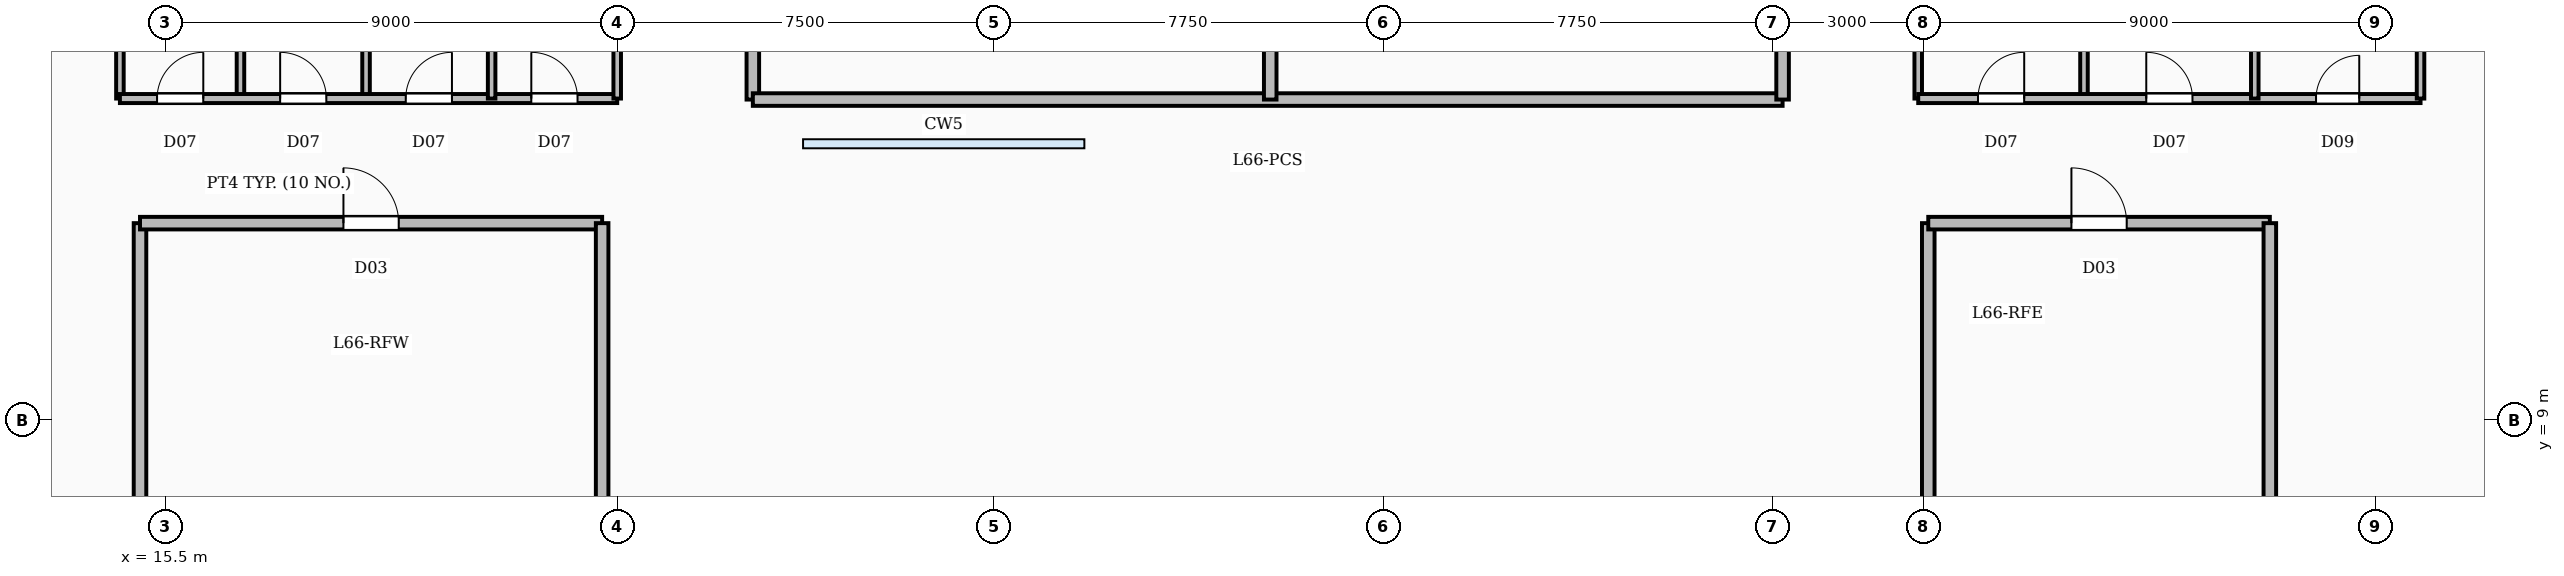
"""IFC4 building model, lengths in metres.
Left out: names, types, materials, properties, quantities, classifications, styles, units other than length and angle.
Written with IfcOpenShell. Run it as: python <this file> out.ifc"""

import sys

from ifc_helpers import new_model, si_unit, direction, frame, frame_2d, origin, origin_2d, place, context, subcontext, project, spatial, rectangle, circle, extrude, element, fill, save


model = new_model("IFC4")
c1 = context("Model", 3, precision=1e-05, world=origin(), true_north=direction((0.0, 1.0)))
c2 = subcontext(c1, "Body", "Model", "MODEL_VIEW")
j1 = project(units=[si_unit("LENGTHUNIT", "METRE"), si_unit("PLANEANGLEUNIT", "RADIAN")], contexts=[c1])
p1 = place(None, origin())
s1 = spatial("IfcSite", under=j1, at=p1, CompositionType="ELEMENT")
p2 = place(p1, origin())
s2 = spatial("IfcBuilding", under=s1, at=p2, CompositionType="ELEMENT")
p3 = place(p2, frame((0.0, 0.0, 269.7)))
s3 = spatial("IfcBuildingStorey", under=s2, at=p3, CompositionType="ELEMENT", Elevation=269.7)
p4 = place(p3, frame((15.208, 5.351, -0.188), z_axis=(-0.120840168881, 0.364867382693, 0.92318440554), x_axis=(-0.949292127021, -0.314395384152, 0.0)))
e1 = element("IfcColumn", 1, at=p4, inside=s3, PredefinedType="COLUMN", context=c2, shape_type="SweptSolid", body=[
    extrude(circle(Radius=0.48, at=origin_2d()), origin(), (0.0, 0.0, 1.0), 5.097),
])
p5 = place(p3, frame((26.659, 4.046, -0.091), z_axis=(-0.205244638376, 0.573148121095, 0.793332130764), x_axis=(-0.941455999234, -0.337135879885, 0.0)))
e2 = element("IfcColumn", 2, at=p5, inside=s3, PredefinedType="COLUMN", context=c2, shape_type="SweptSolid", body=[
    extrude(circle(Radius=0.48, at=origin_2d()), origin(), (0.0, 0.0, 1.0), 5.687),
])
p6 = place(p3, frame((38.11, 2.741, -0.025), z_axis=(-0.259501200742, 0.703591478358, 0.661527141088), x_axis=(-0.938220517325, -0.346037947155, 0.0)))
e3 = element("IfcColumn", 3, at=p6, inside=s3, PredefinedType="COLUMN", context=c2, shape_type="SweptSolid", body=[
    extrude(circle(Radius=0.48, at=origin_2d()), origin(), (0.0, 0.0, 1.0), 6.622),
])
p7 = place(p3, frame((49.56, 1.437, 0.017), z_axis=(-0.292214716361, 0.780171799201, 0.553120713112), x_axis=(-0.936467110828, -0.350755399583, 0.0)))
e4 = element("IfcColumn", 4, at=p7, inside=s3, PredefinedType="COLUMN", context=c2, shape_type="SweptSolid", body=[
    extrude(circle(Radius=0.48, at=origin_2d()), origin(), (0.0, 0.0, 1.0), 7.767),
])
p8 = place(p3, frame((61.011, 0.132, 0.045), z_axis=(-0.312368448743, 0.825846386811, 0.469471721855), x_axis=(-0.935328973768, -0.353779183715, 0.0)))
e5 = element("IfcColumn", 5, at=p8, inside=s3, PredefinedType="COLUMN", context=c2, shape_type="SweptSolid", body=[
    extrude(circle(Radius=0.48, at=origin_2d()), origin(), (0.0, 0.0, 1.0), 9.032),
])
p9 = place(p3, frame((64.854, 1.094, 0.052), z_axis=(-0.31380077532, 0.837654155529, 0.447062175914), x_axis=(-0.936446566902, -0.35081024406, 0.0)))
e6 = element("IfcColumn", 6, at=p9, inside=s3, PredefinedType="COLUMN", context=c2, shape_type="SweptSolid", body=[
    extrude(circle(Radius=0.48, at=origin_2d()), origin(), (0.0, 0.0, 1.0), 9.455),
])
p10 = place(p3, frame((10.241, 10.697, 0.0), z_axis=(0.0, 0.0, 1.0), x_axis=(0.113196122102, 0.993572663644, 0.0)))
e7 = element("IfcWall", 7, at=p10, inside=s3, PredefinedType="SOLIDWALL", context=c2, shape_type="SweptSolid", body=[
    extrude(rectangle(XDim=34.5, YDim=0.42, at=frame_2d((17.25, 0.0))), origin(), (0.0, 0.0, 1.0), 4.75),
])
for number, where, z_axis, x_axis in (
    (8, (17.0, 15.4, 0.0), (0.0, 0.0, 1.0), (0.0, 1.0, 0.0)),
    (9, (19.5, 15.4, 0.0), (0.0, 0.0, 1.0), (0.0, 1.0, 0.0)),
    (10, (22.0, 15.4, 0.0), (0.0, 0.0, 1.0), (0.0, 1.0, 0.0)),
):
    element("IfcWall", number, at=place(p3, frame(where, z_axis=z_axis, x_axis=x_axis)), inside=s3, PredefinedType="PARTITIONING", context=c2, shape_type="SweptSolid", body=[
        extrude(rectangle(XDim=3.58, YDim=0.15, at=frame_2d((1.79, 0.0))), origin(), (0.0, 0.0, 1.0), 3.81),
    ])
p11 = place(p3, frame((14.6, 15.4, 0.0), z_axis=(0.0, 0.0, 1.0), x_axis=(1.0, 0.0, 0.0)))
e11 = element("IfcWall", 11, at=p11, inside=s3, PredefinedType="PARTITIONING", context=c2, shape_type="SweptSolid", body=[
    extrude(rectangle(XDim=9.9, YDim=0.18, at=frame_2d((4.95, 0.0))), origin(), (0.0, 0.0, 1.0), 3.81),
])
p12 = place(p11, frame((0.74, 0.0, 0.0)))
e12 = element("IfcOpeningElement", 12, at=p12, cuts=e11, PredefinedType="OPENING", context=c2, shape_type="SweptSolid", body=[
    extrude(rectangle(XDim=0.92, YDim=2.1, at=frame_2d((0.46, 1.05))), frame((0.0, 0.1, 0.0), z_axis=(0.0, -1.0, 0.0), x_axis=(1.0, 0.0, 0.0)), (0.0, 0.0, 1.0), 0.2),
])
p13 = place(p11, frame((3.19, 0.0, 0.0)))
e13 = element("IfcOpeningElement", 13, at=p13, cuts=e11, PredefinedType="OPENING", context=c2, shape_type="SweptSolid", body=[
    extrude(rectangle(XDim=0.92, YDim=2.1, at=frame_2d((0.46, 1.05))), frame((0.0, 0.1, 0.0), z_axis=(0.0, -1.0, 0.0), x_axis=(1.0, 0.0, 0.0)), (0.0, 0.0, 1.0), 0.2),
])
p14 = place(p11, frame((5.69, 0.0, 0.0)))
e14 = element("IfcOpeningElement", 14, at=p14, cuts=e11, PredefinedType="OPENING", context=c2, shape_type="SweptSolid", body=[
    extrude(rectangle(XDim=0.92, YDim=2.1, at=frame_2d((0.46, 1.05))), frame((0.0, 0.1, 0.0), z_axis=(0.0, -1.0, 0.0), x_axis=(1.0, 0.0, 0.0)), (0.0, 0.0, 1.0), 0.2),
])
p15 = place(p11, frame((8.19, 0.0, 0.0)))
e15 = element("IfcOpeningElement", 15, at=p15, cuts=e11, PredefinedType="OPENING", context=c2, shape_type="SweptSolid", body=[
    extrude(rectangle(XDim=0.92, YDim=2.1, at=frame_2d((0.46, 1.05))), frame((0.0, 0.1, 0.0), z_axis=(0.0, -1.0, 0.0), x_axis=(1.0, 0.0, 0.0)), (0.0, 0.0, 1.0), 0.2),
])
for number, where, z_axis, x_axis in (
    (16, (14.6, 15.4, 0.0), (0.0, 0.0, 1.0), (0.0, 1.0, 0.0)),
    (17, (24.5, 15.4, 0.0), (0.0, 0.0, 1.0), (0.0, 1.0, 0.0)),
):
    element("IfcWall", number, at=place(p3, frame(where, z_axis=z_axis, x_axis=x_axis)), inside=s3, PredefinedType="PARTITIONING", context=c2, shape_type="SweptSolid", body=[
        extrude(rectangle(XDim=3.58, YDim=0.15, at=frame_2d((1.79, 0.0))), origin(), (0.0, 0.0, 1.0), 2.8),
    ])
for number, where, z_axis, x_axis in (
    (18, (53.7, 15.4, 0.0), (0.0, 0.0, 1.0), (0.0, 1.0, 0.0)),
    (19, (57.1, 15.4, 0.0), (0.0, 0.0, 1.0), (0.0, 1.0, 0.0)),
):
    element("IfcWall", number, at=place(p3, frame(where, z_axis=z_axis, x_axis=x_axis)), inside=s3, PredefinedType="PARTITIONING", context=c2, shape_type="SweptSolid", body=[
        extrude(rectangle(XDim=3.58, YDim=0.15, at=frame_2d((1.79, 0.0))), origin(), (0.0, 0.0, 1.0), 3.81),
    ])
p16 = place(p3, frame((50.4, 15.4, 0.0), z_axis=(0.0, 0.0, 1.0), x_axis=(1.0, 0.0, 0.0)))
e20 = element("IfcWall", 20, at=p16, inside=s3, PredefinedType="SOLIDWALL", context=c2, shape_type="SweptSolid", body=[
    extrude(rectangle(XDim=10.0, YDim=0.18, at=frame_2d((5.0, 0.0))), origin(), (0.0, 0.0, 1.0), 3.81),
])
p17 = place(p16, frame((1.19, 0.0, 0.0)))
e21 = element("IfcOpeningElement", 21, at=p17, cuts=e20, PredefinedType="OPENING", context=c2, shape_type="SweptSolid", body=[
    extrude(rectangle(XDim=0.92, YDim=2.1, at=frame_2d((0.46, 1.05))), frame((0.0, 0.1, 0.0), z_axis=(0.0, -1.0, 0.0), x_axis=(1.0, 0.0, 0.0)), (0.0, 0.0, 1.0), 0.2),
])
p18 = place(p16, frame((4.54, 0.0, 0.0)))
e22 = element("IfcOpeningElement", 22, at=p18, cuts=e20, PredefinedType="OPENING", context=c2, shape_type="SweptSolid", body=[
    extrude(rectangle(XDim=0.92, YDim=2.1, at=frame_2d((0.46, 1.05))), frame((0.0, 0.1, 0.0), z_axis=(0.0, -1.0, 0.0), x_axis=(1.0, 0.0, 0.0)), (0.0, 0.0, 1.0), 0.2),
])
p19 = place(p16, frame((7.92, 0.0, 0.0)))
e23 = element("IfcOpeningElement", 23, at=p19, cuts=e20, PredefinedType="OPENING", context=c2, shape_type="SweptSolid", body=[
    extrude(rectangle(XDim=0.86, YDim=2.05, at=frame_2d((0.43, 1.025))), frame((0.0, 0.1, 0.0), z_axis=(0.0, -1.0, 0.0), x_axis=(1.0, 0.0, 0.0)), (0.0, 0.0, 1.0), 0.2),
])
for number, where, z_axis, x_axis in (
    (24, (50.4, 15.4, 0.0), (0.0, 0.0, 1.0), (0.0, 1.0, 0.0)),
    (25, (60.4, 15.4, 0.0), (0.0, 0.0, 1.0), (0.0, 1.0, 0.0)),
):
    element("IfcWall", number, at=place(p3, frame(where, z_axis=z_axis, x_axis=x_axis)), inside=s3, PredefinedType="PARTITIONING", context=c2, shape_type="SweptSolid", body=[
        extrude(rectangle(XDim=3.58, YDim=0.15, at=frame_2d((1.79, 0.0))), origin(), (0.0, 0.0, 1.0), 2.8),
    ])
p20 = place(p3, frame((37.5, 15.38, 0.0), z_axis=(0.0, 0.0, 1.0), x_axis=(0.0, 1.0, 0.0)))
e26 = element("IfcWall", 26, at=p20, inside=s3, PredefinedType="SOLIDWALL", context=c2, shape_type="SweptSolid", body=[
    extrude(rectangle(XDim=20.84, YDim=0.25, at=frame_2d((10.42, 0.0))), origin(), (0.0, 0.0, 1.0), 3.81),
])
p21 = place(p3, frame((27.2, 15.38, 0.0), z_axis=(0.0, 0.0, 1.0), x_axis=(1.0, 0.0, 0.0)))
e27 = element("IfcWall", 27, at=p21, inside=s3, PredefinedType="SOLIDWALL", context=c2, shape_type="SweptSolid", body=[
    extrude(rectangle(XDim=20.5, YDim=0.25, at=frame_2d((10.25, 0.0))), origin(), (0.0, 0.0, 1.0), 3.81),
])
p22 = place(p3, frame((27.2, 15.38, 0.0), z_axis=(0.0, 0.0, 1.0), x_axis=(0.0, 1.0, 0.0)))
e28 = element("IfcWall", 28, at=p22, inside=s3, PredefinedType="SOLIDWALL", context=c2, shape_type="SweptSolid", body=[
    extrude(rectangle(XDim=20.84, YDim=0.25, at=frame_2d((10.42, 0.0))), origin(), (0.0, 0.0, 1.0), 3.81),
])
p23 = place(p22, frame((4.8, 0.0, 0.0)))
e29 = element("IfcOpeningElement", 29, at=p23, cuts=e28, PredefinedType="OPENING", context=c2, shape_type="SweptSolid", body=[
    extrude(rectangle(XDim=1.2, YDim=2.2, at=frame_2d((0.6, 1.1))), frame((0.0, 0.135, 0.0), z_axis=(0.0, -1.0, 0.0), x_axis=(1.0, 0.0, 0.0)), (0.0, 0.0, 1.0), 0.27),
])
p24 = place(p22, frame((14.5, 0.0, 0.0)))
e30 = element("IfcOpeningElement", 30, at=p24, cuts=e28, PredefinedType="OPENING", context=c2, shape_type="SweptSolid", body=[
    extrude(rectangle(XDim=1.2, YDim=2.2, at=frame_2d((0.6, 1.1))), frame((0.0, 0.135, 0.0), z_axis=(0.0, -1.0, 0.0), x_axis=(1.0, 0.0, 0.0)), (0.0, 0.0, 1.0), 0.27),
])
p25 = place(p3, frame((47.7, 15.38, 0.0), z_axis=(0.0, 0.0, 1.0), x_axis=(0.0, 1.0, 0.0)))
e31 = element("IfcWall", 31, at=p25, inside=s3, PredefinedType="SOLIDWALL", context=c2, shape_type="SweptSolid", body=[
    extrude(rectangle(XDim=20.84, YDim=0.25, at=frame_2d((10.42, 0.0))), origin(), (0.0, 0.0, 1.0), 3.81),
])
p26 = place(p25, frame((4.8, 0.0, 0.0)))
e32 = element("IfcOpeningElement", 32, at=p26, cuts=e31, PredefinedType="OPENING", context=c2, shape_type="SweptSolid", body=[
    extrude(rectangle(XDim=1.2, YDim=2.2, at=frame_2d((0.6, 1.1))), frame((0.0, 0.135, 0.0), z_axis=(0.0, -1.0, 0.0), x_axis=(1.0, 0.0, 0.0)), (0.0, 0.0, 1.0), 0.27),
])
p27 = place(p25, frame((14.5, 0.0, 0.0)))
e33 = element("IfcOpeningElement", 33, at=p27, cuts=e31, PredefinedType="OPENING", context=c2, shape_type="SweptSolid", body=[
    extrude(rectangle(XDim=1.2, YDim=2.2, at=frame_2d((0.6, 1.1))), frame((0.0, 0.135, 0.0), z_axis=(0.0, -1.0, 0.0), x_axis=(1.0, 0.0, 0.0)), (0.0, 0.0, 1.0), 0.27),
])
p28 = place(p3, frame((15.0, 12.92, 0.0), z_axis=(0.0, 0.0, 1.0), x_axis=(1.0, 0.0, 0.0)))
e34 = element("IfcWall", 34, at=p28, inside=s3, PredefinedType="SOLIDWALL", context=c2, shape_type="SweptSolid", body=[
    extrude(rectangle(XDim=9.2, YDim=0.25, at=frame_2d((4.6, 0.0))), origin(), (0.0, 0.0, 1.0), 3.81),
])
p29 = place(p28, frame((4.05, 0.0, 0.0)))
e35 = element("IfcOpeningElement", 35, at=p29, cuts=e34, PredefinedType="OPENING", context=c2, shape_type="SweptSolid", body=[
    extrude(rectangle(XDim=1.1, YDim=2.15, at=frame_2d((0.55, 1.075))), frame((0.0, 0.135, 0.0), z_axis=(0.0, -1.0, 0.0), x_axis=(1.0, 0.0, 0.0)), (0.0, 0.0, 1.0), 0.27),
])
p30 = place(p3, frame((15.0, 5.284, 0.0), z_axis=(0.0, 0.0, 1.0), x_axis=(0.0, 1.0, 0.0)))
e36 = element("IfcWall", 36, at=p30, inside=s3, PredefinedType="SOLIDWALL", context=c2, shape_type="SweptSolid", body=[
    extrude(rectangle(XDim=7.636, YDim=0.25, at=frame_2d((3.818, 0.0))), origin(), (0.0, 0.0, 1.0), 2.8),
])
p31 = place(p3, frame((24.2, 4.236, 0.0), z_axis=(0.0, 0.0, 1.0), x_axis=(0.0, 1.0, 0.0)))
e37 = element("IfcWall", 37, at=p31, inside=s3, PredefinedType="SOLIDWALL", context=c2, shape_type="SweptSolid", body=[
    extrude(rectangle(XDim=8.684, YDim=0.25, at=frame_2d((4.342, 0.0))), origin(), (0.0, 0.0, 1.0), 3.81),
])
p32 = place(p3, frame((50.6, 12.92, 0.0), z_axis=(0.0, 0.0, 1.0), x_axis=(1.0, 0.0, 0.0)))
e38 = element("IfcWall", 38, at=p32, inside=s3, PredefinedType="SOLIDWALL", context=c2, shape_type="SweptSolid", body=[
    extrude(rectangle(XDim=6.8, YDim=0.25, at=frame_2d((3.4, 0.0))), origin(), (0.0, 0.0, 1.0), 3.81),
])
p33 = place(p32, frame((2.85, 0.0, 0.0)))
e39 = element("IfcOpeningElement", 39, at=p33, cuts=e38, PredefinedType="OPENING", context=c2, shape_type="SweptSolid", body=[
    extrude(rectangle(XDim=1.1, YDim=2.15, at=frame_2d((0.55, 1.075))), frame((0.0, 0.135, 0.0), z_axis=(0.0, -1.0, 0.0), x_axis=(1.0, 0.0, 0.0)), (0.0, 0.0, 1.0), 0.27),
])
p34 = place(p3, frame((50.6, 1.228, 0.0), z_axis=(0.0, 0.0, 1.0), x_axis=(0.0, 1.0, 0.0)))
e40 = element("IfcWall", 40, at=p34, inside=s3, PredefinedType="SOLIDWALL", context=c2, shape_type="SweptSolid", body=[
    extrude(rectangle(XDim=11.692, YDim=0.25, at=frame_2d((5.846, 0.0))), origin(), (0.0, 0.0, 1.0), 3.81),
])
p35 = place(p3, frame((57.4, 0.453, 0.0), z_axis=(0.0, 0.0, 1.0), x_axis=(0.0, 1.0, 0.0)))
e41 = element("IfcWall", 41, at=p35, inside=s3, PredefinedType="SOLIDWALL", context=c2, shape_type="SweptSolid", body=[
    extrude(rectangle(XDim=12.467, YDim=0.25, at=frame_2d((6.233, 0.0))), origin(), (0.0, 0.0, 1.0), 3.81),
])
p36 = place(p12, origin())
e42 = element("IfcDoor", 42, at=p36, inside=s3, OperationType="SINGLE_SWING_RIGHT", PredefinedType="DOOR", context=c2, shape_type="SweptSolid", body=[
    extrude(rectangle(XDim=0.92, YDim=2.1, at=frame_2d((0.46, 1.05))), frame((0.0, 0.025, 0.0), z_axis=(0.0, -1.0, 0.0), x_axis=(1.0, 0.0, 0.0)), (0.0, 0.0, 1.0), 0.05),
])
fill(e12, e42)
p37 = place(p13, origin())
e43 = element("IfcDoor", 43, at=p37, inside=s3, OperationType="SINGLE_SWING_LEFT", PredefinedType="DOOR", context=c2, shape_type="SweptSolid", body=[
    extrude(rectangle(XDim=0.92, YDim=2.1, at=frame_2d((0.46, 1.05))), frame((0.0, 0.025, 0.0), z_axis=(0.0, -1.0, 0.0), x_axis=(1.0, 0.0, 0.0)), (0.0, 0.0, 1.0), 0.05),
])
fill(e13, e43)
p38 = place(p14, origin())
e44 = element("IfcDoor", 44, at=p38, inside=s3, OperationType="SINGLE_SWING_RIGHT", PredefinedType="DOOR", context=c2, shape_type="SweptSolid", body=[
    extrude(rectangle(XDim=0.92, YDim=2.1, at=frame_2d((0.46, 1.05))), frame((0.0, 0.025, 0.0), z_axis=(0.0, -1.0, 0.0), x_axis=(1.0, 0.0, 0.0)), (0.0, 0.0, 1.0), 0.05),
])
fill(e14, e44)
p39 = place(p15, origin())
e45 = element("IfcDoor", 45, at=p39, inside=s3, OperationType="SINGLE_SWING_LEFT", PredefinedType="DOOR", context=c2, shape_type="SweptSolid", body=[
    extrude(rectangle(XDim=0.92, YDim=2.1, at=frame_2d((0.46, 1.05))), frame((0.0, 0.025, 0.0), z_axis=(0.0, -1.0, 0.0), x_axis=(1.0, 0.0, 0.0)), (0.0, 0.0, 1.0), 0.05),
])
fill(e15, e45)
p40 = place(p17, origin())
e46 = element("IfcDoor", 46, at=p40, inside=s3, OperationType="SINGLE_SWING_RIGHT", PredefinedType="DOOR", context=c2, shape_type="SweptSolid", body=[
    extrude(rectangle(XDim=0.92, YDim=2.1, at=frame_2d((0.46, 1.05))), frame((0.0, 0.025, 0.0), z_axis=(0.0, -1.0, 0.0), x_axis=(1.0, 0.0, 0.0)), (0.0, 0.0, 1.0), 0.05),
])
fill(e21, e46)
p41 = place(p18, origin())
e47 = element("IfcDoor", 47, at=p41, inside=s3, OperationType="SINGLE_SWING_LEFT", PredefinedType="DOOR", context=c2, shape_type="SweptSolid", body=[
    extrude(rectangle(XDim=0.92, YDim=2.1, at=frame_2d((0.46, 1.05))), frame((0.0, 0.025, 0.0), z_axis=(0.0, -1.0, 0.0), x_axis=(1.0, 0.0, 0.0)), (0.0, 0.0, 1.0), 0.05),
])
fill(e22, e47)
p42 = place(p19, origin())
e48 = element("IfcDoor", 48, at=p42, inside=s3, OperationType="SINGLE_SWING_RIGHT", PredefinedType="DOOR", context=c2, shape_type="SweptSolid", body=[
    extrude(rectangle(XDim=0.86, YDim=2.05, at=frame_2d((0.43, 1.025))), frame((0.0, 0.025, 0.0), z_axis=(0.0, -1.0, 0.0), x_axis=(1.0, 0.0, 0.0)), (0.0, 0.0, 1.0), 0.05),
])
fill(e23, e48)
p43 = place(p29, origin())
e49 = element("IfcDoor", 49, at=p43, inside=s3, OperationType="SINGLE_SWING_LEFT", PredefinedType="DOOR", context=c2, shape_type="SweptSolid", body=[
    extrude(rectangle(XDim=1.1, YDim=2.15, at=frame_2d((0.55, 1.075))), frame((0.0, 0.025, 0.0), z_axis=(0.0, -1.0, 0.0), x_axis=(1.0, 0.0, 0.0)), (0.0, 0.0, 1.0), 0.05),
])
fill(e35, e49)
p44 = place(p33, origin())
e50 = element("IfcDoor", 50, at=p44, inside=s3, OperationType="SINGLE_SWING_LEFT", PredefinedType="DOOR", context=c2, shape_type="SweptSolid", body=[
    extrude(rectangle(XDim=1.1, YDim=2.15, at=frame_2d((0.55, 1.075))), frame((0.0, 0.025, 0.0), z_axis=(0.0, -1.0, 0.0), x_axis=(1.0, 0.0, 0.0)), (0.0, 0.0, 1.0), 0.05),
])
fill(e39, e50)
save(model, sys.argv[1])
